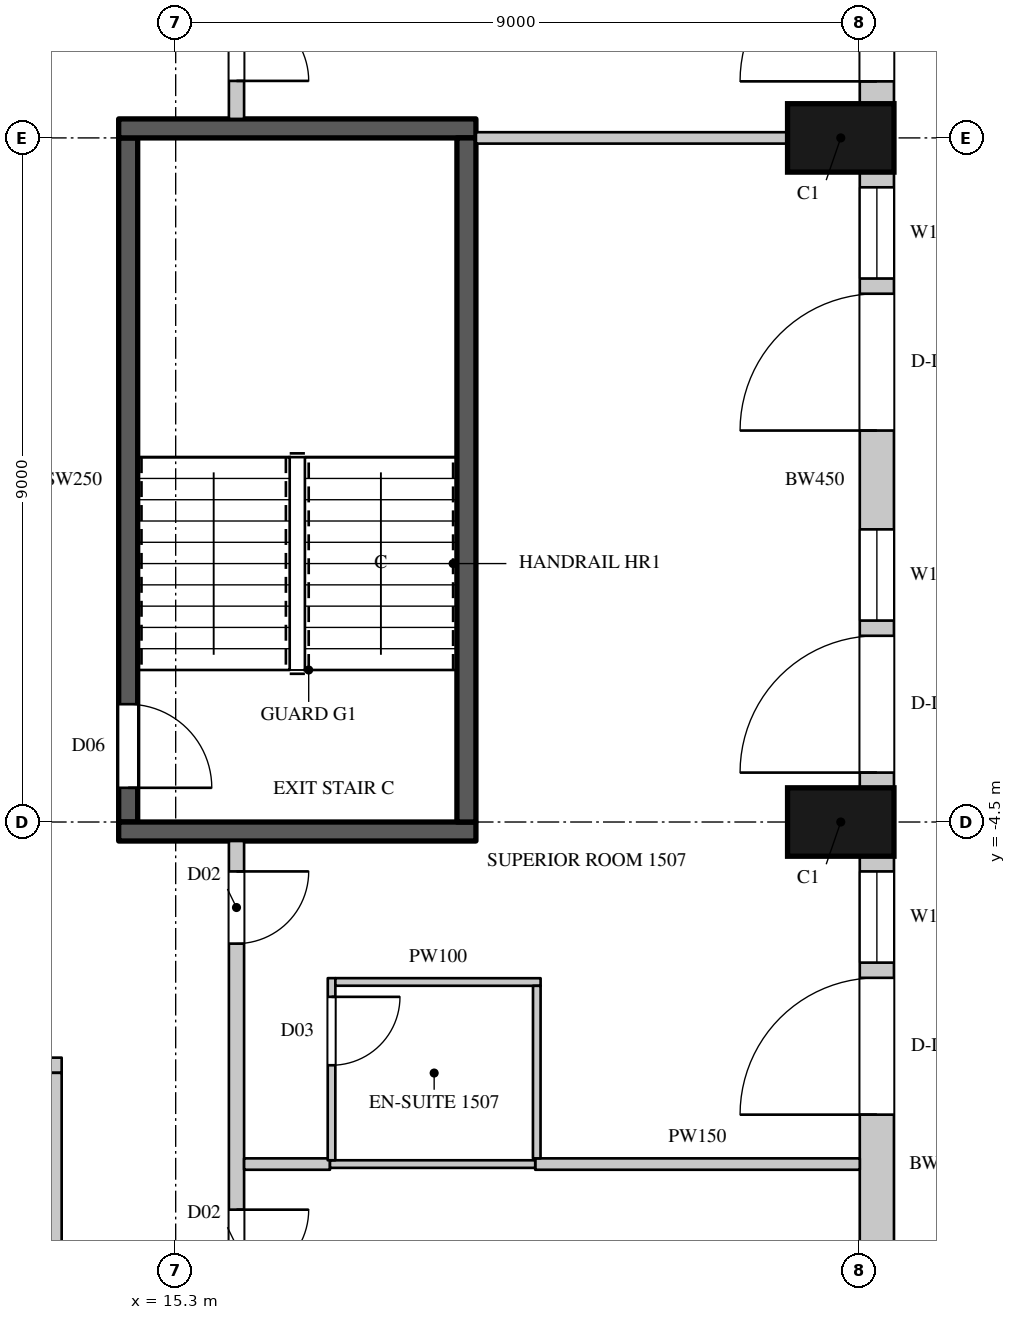
"""IFC4 building model, lengths in metres.
Left out: names, types, materials, properties, quantities, classifications, styles, units other than length and angle.
Written with IfcOpenShell. Run it as: python <this file> out.ifc"""

import sys

from ifc_helpers import new_model, si_unit, direction, frame, frame_2d, origin, origin_2d, place, context, subcontext, project, spatial, rectangle, extrude, element, fill, save


model = new_model("IFC4")
c1 = context("Model", 3, precision=1e-05, world=origin(), true_north=direction((0.0, 1.0)))
c2 = subcontext(c1, "Body", "Model", "MODEL_VIEW")
j1 = project(units=[si_unit("LENGTHUNIT", "METRE"), si_unit("PLANEANGLEUNIT", "RADIAN")], contexts=[c1])
p1 = place(None, origin())
s1 = spatial("IfcSite", under=j1, at=p1, CompositionType="ELEMENT")
p2 = place(p1, origin())
s2 = spatial("IfcBuilding", under=s1, at=p2, CompositionType="ELEMENT")
p3 = place(p2, frame((0.0, 0.0, 84.3)))
s3 = spatial("IfcBuildingStorey", under=s2, at=p3, CompositionType="ELEMENT", Elevation=84.3)
for number, where, z_axis, x_axis in (
    (1, (24.05, -4.5, 0.0), (0.0, 0.0, 1.0), (0.0, 1.0, 0.0)),
    (2, (24.05, 4.5, 0.0), (0.0, 0.0, 1.0), (0.0, 1.0, 0.0)),
):
    element("IfcColumn", number, at=place(p3, frame(where, z_axis=z_axis, x_axis=x_axis)), inside=s3, PredefinedType="COLUMN", context=c2, shape_type="SweptSolid", body=[
        extrude(rectangle(XDim=0.9, YDim=1.4, at=origin_2d()), origin(), (0.0, 0.0, 1.0), 3.6),
    ])
p4 = place(p3, frame((24.525, -13.05, 0.0), z_axis=(0.0, 0.0, 1.0), x_axis=(0.0, 1.0, 0.0)))
e3 = element("IfcWall", 3, at=p4, inside=s3, PredefinedType="SOLIDWALL", context=c2, shape_type="SweptSolid", body=[
    extrude(rectangle(XDim=8.1, YDim=0.45, at=frame_2d((4.05, 0.0))), origin(), (0.0, 0.0, 1.0), 3.3),
])
p5 = place(p4, frame((0.9, 0.0, 0.0)))
e4 = element("IfcOpeningElement", 4, at=p5, cuts=e3, PredefinedType="OPENING", context=c2, shape_type="SweptSolid", body=[
    extrude(rectangle(XDim=1.8, YDim=2.4, at=frame_2d((0.9, 1.2))), frame((0.0, 0.235, 0.0), z_axis=(0.0, -1.0, 0.0), x_axis=(1.0, 0.0, 0.0)), (0.0, 0.0, 1.0), 0.47),
])
p6 = place(p4, frame((4.7, 0.0, 0.0)))
e5 = element("IfcOpeningElement", 5, at=p6, cuts=e3, PredefinedType="OPENING", context=c2, shape_type="SweptSolid", body=[
    extrude(rectangle(XDim=1.8, YDim=2.4, at=frame_2d((0.9, 1.2))), frame((0.0, 0.235, 0.0), z_axis=(0.0, -1.0, 0.0), x_axis=(1.0, 0.0, 0.0)), (0.0, 0.0, 1.0), 0.47),
])
p7 = place(p4, frame((6.7, 0.0, 1.05)))
e6 = element("IfcOpeningElement", 6, at=p7, cuts=e3, PredefinedType="OPENING", context=c2, shape_type="SweptSolid", body=[
    extrude(rectangle(XDim=1.2, YDim=2.0, at=frame_2d((0.6, 1.0))), frame((0.0, 0.235, 0.0), z_axis=(0.0, -1.0, 0.0), x_axis=(1.0, 0.0, 0.0)), (0.0, 0.0, 1.0), 0.47),
])
p8 = place(p3, frame((24.525, -4.05, 0.0), z_axis=(0.0, 0.0, 1.0), x_axis=(0.0, 1.0, 0.0)))
e7 = element("IfcWall", 7, at=p8, inside=s3, PredefinedType="SOLIDWALL", context=c2, shape_type="SweptSolid", body=[
    extrude(rectangle(XDim=8.1, YDim=0.45, at=frame_2d((4.05, 0.0))), origin(), (0.0, 0.0, 1.0), 3.3),
])
p9 = place(p8, frame((0.2, 0.0, 0.0)))
e8 = element("IfcOpeningElement", 8, at=p9, cuts=e7, PredefinedType="OPENING", context=c2, shape_type="SweptSolid", body=[
    extrude(rectangle(XDim=1.8, YDim=2.4, at=frame_2d((0.9, 1.2))), frame((0.0, 0.235, 0.0), z_axis=(0.0, -1.0, 0.0), x_axis=(1.0, 0.0, 0.0)), (0.0, 0.0, 1.0), 0.47),
])
p10 = place(p8, frame((2.2, 0.0, 1.05)))
e9 = element("IfcOpeningElement", 9, at=p10, cuts=e7, PredefinedType="OPENING", context=c2, shape_type="SweptSolid", body=[
    extrude(rectangle(XDim=1.2, YDim=2.0, at=frame_2d((0.6, 1.0))), frame((0.0, 0.235, 0.0), z_axis=(0.0, -1.0, 0.0), x_axis=(1.0, 0.0, 0.0)), (0.0, 0.0, 1.0), 0.47),
])
p11 = place(p8, frame((4.7, 0.0, 0.0)))
e10 = element("IfcOpeningElement", 10, at=p11, cuts=e7, PredefinedType="OPENING", context=c2, shape_type="SweptSolid", body=[
    extrude(rectangle(XDim=1.8, YDim=2.4, at=frame_2d((0.9, 1.2))), frame((0.0, 0.235, 0.0), z_axis=(0.0, -1.0, 0.0), x_axis=(1.0, 0.0, 0.0)), (0.0, 0.0, 1.0), 0.47),
])
p12 = place(p8, frame((6.7, 0.0, 1.05)))
e11 = element("IfcOpeningElement", 11, at=p12, cuts=e7, PredefinedType="OPENING", context=c2, shape_type="SweptSolid", body=[
    extrude(rectangle(XDim=1.2, YDim=2.0, at=frame_2d((0.6, 1.0))), frame((0.0, 0.235, 0.0), z_axis=(0.0, -1.0, 0.0), x_axis=(1.0, 0.0, 0.0)), (0.0, 0.0, 1.0), 0.47),
])
p13 = place(p3, frame((24.525, 4.95, 0.0), z_axis=(0.0, 0.0, 1.0), x_axis=(0.0, 1.0, 0.0)))
e12 = element("IfcWall", 12, at=p13, inside=s3, PredefinedType="SOLIDWALL", context=c2, shape_type="SweptSolid", body=[
    extrude(rectangle(XDim=8.439, YDim=0.45, at=frame_2d((4.219, 0.0))), origin(), (0.0, 0.0, 1.0), 3.3),
])
p14 = place(p13, frame((0.294, 0.0, 0.0)))
e13 = element("IfcOpeningElement", 13, at=p14, cuts=e12, PredefinedType="OPENING", context=c2, shape_type="SweptSolid", body=[
    extrude(rectangle(XDim=1.8, YDim=2.4, at=frame_2d((0.9, 1.2))), frame((0.0, 0.235, 0.0), z_axis=(0.0, -1.0, 0.0), x_axis=(1.0, 0.0, 0.0)), (0.0, 0.0, 1.0), 0.47),
])
p15 = place(p13, frame((2.294, 0.0, 1.05)))
e14 = element("IfcOpeningElement", 14, at=p15, cuts=e12, PredefinedType="OPENING", context=c2, shape_type="SweptSolid", body=[
    extrude(rectangle(XDim=1.2, YDim=2.0, at=frame_2d((0.6, 1.0))), frame((0.0, 0.235, 0.0), z_axis=(0.0, -1.0, 0.0), x_axis=(1.0, 0.0, 0.0)), (0.0, 0.0, 1.0), 0.47),
])
p16 = place(p13, frame((5.232, 0.0, 1.05)))
e15 = element("IfcOpeningElement", 15, at=p16, cuts=e12, PredefinedType="OPENING", context=c2, shape_type="SweptSolid", body=[
    extrude(rectangle(XDim=2.7, YDim=2.0, at=frame_2d((1.35, 1.0))), frame((0.0, 0.235, 0.0), z_axis=(0.0, -1.0, 0.0), x_axis=(1.0, 0.0, 0.0)), (0.0, 0.0, 1.0), 0.47),
])
p17 = place(p3, frame((10.1, -7.7, 0.0), z_axis=(0.0, 0.0, 1.0), x_axis=(1.0, 0.0, 0.0)))
e16 = element("IfcWall", 16, at=p17, inside=s3, PredefinedType="PARTITIONING", context=c2, shape_type="SweptSolid", body=[
    extrude(rectangle(XDim=3.7, YDim=0.2, at=frame_2d((1.85, 0.0))), origin(), (0.0, 0.0, 1.0), 3.3),
])
p18 = place(p17, frame((2.45, 0.0, 0.0)))
e17 = element("IfcOpeningElement", 17, at=p18, cuts=e16, PredefinedType="OPENING", context=c2, shape_type="SweptSolid", body=[
    extrude(rectangle(XDim=0.9, YDim=2.2, at=frame_2d((0.45, 1.1))), frame((0.0, 0.11, 0.0), z_axis=(0.0, -1.0, 0.0), x_axis=(1.0, 0.0, 0.0)), (0.0, 0.0, 1.0), 0.22),
])
p19 = place(p3, frame((13.7, -15.0, 0.0), z_axis=(0.0, 0.0, 1.0), x_axis=(0.0, 1.0, 0.0)))
e18 = element("IfcWall", 18, at=p19, inside=s3, PredefinedType="PARTITIONING", context=c2, shape_type="SweptSolid", body=[
    extrude(rectangle(XDim=7.2, YDim=0.2, at=frame_2d((3.6, 0.0))), origin(), (0.0, 0.0, 1.0), 3.3),
])
p20 = place(p3, frame((16.1, -17.5, 0.0), z_axis=(0.0, 0.0, 1.0), x_axis=(0.0, 1.0, 0.0)))
e19 = element("IfcWall", 19, at=p20, inside=s3, PredefinedType="PARTITIONING", context=c2, shape_type="SweptSolid", body=[
    extrude(rectangle(XDim=12.75, YDim=0.2, at=frame_2d((6.375, 0.0))), origin(), (0.0, 0.0, 1.0), 3.3),
])
p21 = place(p20, frame((2.75, 0.0, 0.0)))
e20 = element("IfcOpeningElement", 20, at=p21, cuts=e19, PredefinedType="OPENING", context=c2, shape_type="SweptSolid", body=[
    extrude(rectangle(XDim=0.95, YDim=2.2, at=frame_2d((0.475, 1.1))), frame((0.0, 0.11, 0.0), z_axis=(0.0, -1.0, 0.0), x_axis=(1.0, 0.0, 0.0)), (0.0, 0.0, 1.0), 0.22),
])
p22 = place(p20, frame((6.95, 0.0, 0.0)))
e21 = element("IfcOpeningElement", 21, at=p22, cuts=e19, PredefinedType="OPENING", context=c2, shape_type="SweptSolid", body=[
    extrude(rectangle(XDim=0.95, YDim=2.2, at=frame_2d((0.475, 1.1))), frame((0.0, 0.11, 0.0), z_axis=(0.0, -1.0, 0.0), x_axis=(1.0, 0.0, 0.0)), (0.0, 0.0, 1.0), 0.22),
])
p23 = place(p20, frame((11.4, 0.0, 0.0)))
e22 = element("IfcOpeningElement", 22, at=p23, cuts=e19, PredefinedType="OPENING", context=c2, shape_type="SweptSolid", body=[
    extrude(rectangle(XDim=0.95, YDim=2.2, at=frame_2d((0.475, 1.1))), frame((0.0, 0.11, 0.0), z_axis=(0.0, -1.0, 0.0), x_axis=(1.0, 0.0, 0.0)), (0.0, 0.0, 1.0), 0.22),
])
p24 = place(p3, frame((16.1, 4.75, 0.0), z_axis=(0.0, 0.0, 1.0), x_axis=(0.0, 1.0, 0.0)))
e23 = element("IfcWall", 23, at=p24, inside=s3, PredefinedType="PARTITIONING", context=c2, shape_type="SweptSolid", body=[
    extrude(rectangle(XDim=12.65, YDim=0.2, at=frame_2d((6.325, 0.0))), origin(), (0.0, 0.0, 1.0), 3.3),
])
p25 = place(p24, frame((0.5, 0.0, 0.0)))
e24 = element("IfcOpeningElement", 24, at=p25, cuts=e23, PredefinedType="OPENING", context=c2, shape_type="SweptSolid", body=[
    extrude(rectangle(XDim=0.95, YDim=2.2, at=frame_2d((0.475, 1.1))), frame((0.0, 0.11, 0.0), z_axis=(0.0, -1.0, 0.0), x_axis=(1.0, 0.0, 0.0)), (0.0, 0.0, 1.0), 0.22),
])
p26 = place(p24, frame((6.9, 0.0, 0.0)))
e25 = element("IfcOpeningElement", 25, at=p26, cuts=e23, PredefinedType="OPENING", context=c2, shape_type="SweptSolid", body=[
    extrude(rectangle(XDim=0.95, YDim=2.2, at=frame_2d((0.475, 1.1))), frame((0.0, 0.11, 0.0), z_axis=(0.0, -1.0, 0.0), x_axis=(1.0, 0.0, 0.0)), (0.0, 0.0, 1.0), 0.22),
])
p27 = place(p3, frame((16.2, -9.0, 0.0), z_axis=(0.0, 0.0, 1.0), x_axis=(1.0, 0.0, 0.0)))
e26 = element("IfcWall", 26, at=p27, inside=s3, PredefinedType="PARTITIONING", context=c2, shape_type="SweptSolid", body=[
    extrude(rectangle(XDim=1.13, YDim=0.15, at=frame_2d((0.565, 0.0))), origin(), (0.0, 0.0, 1.0), 2.65),
])
p28 = place(p3, frame((19.25, 4.5, 0.0), z_axis=(0.0, 0.0, 1.0), x_axis=(1.0, 0.0, 0.0)))
e27 = element("IfcWall", 27, at=p28, inside=s3, PredefinedType="PARTITIONING", context=c2, shape_type="SweptSolid", body=[
    extrude(rectangle(XDim=4.1, YDim=0.15, at=frame_2d((2.05, 0.0))), origin(), (0.0, 0.0, 1.0), 3.3),
])
p29 = place(p3, frame((20.03, -9.0, 0.0), z_axis=(0.0, 0.0, 1.0), x_axis=(1.0, 0.0, 0.0)))
e28 = element("IfcWall", 28, at=p29, inside=s3, PredefinedType="PARTITIONING", context=c2, shape_type="SweptSolid", body=[
    extrude(rectangle(XDim=4.27, YDim=0.15, at=frame_2d((2.135, 0.0))), origin(), (0.0, 0.0, 1.0), 2.65),
])
p30 = place(p3, frame((14.675, -4.5, 0.0), z_axis=(0.0, 0.0, 1.0), x_axis=(0.0, 1.0, 0.0)))
e29 = element("IfcWall", 29, at=p30, inside=s3, PredefinedType="SHEAR", context=c2, shape_type="SweptSolid", body=[
    extrude(rectangle(XDim=9.0, YDim=0.25, at=frame_2d((4.5, 0.0))), origin(), (0.0, 0.0, 1.0), 3.3),
])
p31 = place(p30, frame((0.45, 0.0, 0.0)))
e30 = element("IfcOpeningElement", 30, at=p31, cuts=e29, PredefinedType="OPENING", context=c2, shape_type="SweptSolid", body=[
    extrude(rectangle(XDim=1.1, YDim=2.2, at=frame_2d((0.55, 1.1))), frame((0.0, 0.135, 0.0), z_axis=(0.0, -1.0, 0.0), x_axis=(1.0, 0.0, 0.0)), (0.0, 0.0, 1.0), 0.27),
])
for number, where, z_axis, x_axis in (
    (31, (14.55, -4.625, 0.0), (0.0, 0.0, 1.0), (1.0, 0.0, 0.0)),
    (32, (14.55, 4.625, 0.0), (0.0, 0.0, 1.0), (1.0, 0.0, 0.0)),
):
    element("IfcWall", number, at=place(p3, frame(where, z_axis=z_axis, x_axis=x_axis)), inside=s3, PredefinedType="SHEAR", context=c2, shape_type="SweptSolid", body=[
        extrude(rectangle(XDim=4.7, YDim=0.25, at=frame_2d((2.35, 0.0))), origin(), (0.0, 0.0, 1.0), 3.3),
    ])
p32 = place(p3, frame((19.125, -4.5, 0.0), z_axis=(0.0, 0.0, 1.0), x_axis=(0.0, 1.0, 0.0)))
e33 = element("IfcWall", 33, at=p32, inside=s3, PredefinedType="SHEAR", context=c2, shape_type="SweptSolid", body=[
    extrude(rectangle(XDim=9.0, YDim=0.25, at=frame_2d((4.5, 0.0))), origin(), (0.0, 0.0, 1.0), 3.3),
])
p33 = place(p3, frame((17.33, -9.0, 0.0), z_axis=(0.0, 0.0, 1.0), x_axis=(1.0, 0.0, 0.0)))
e34 = element("IfcWall", 34, at=p33, inside=s3, PredefinedType="PARTITIONING", context=c2, shape_type="SweptSolid", body=[
    extrude(rectangle(XDim=2.7, YDim=0.1, at=frame_2d((1.35, 0.0))), origin(), (0.0, 0.0, 1.0), 2.65),
])
p34 = place(p3, frame((17.35, -8.95, 0.0), z_axis=(0.0, 0.0, 1.0), x_axis=(0.000407580973, 0.999999916939, 0.0)))
e35 = element("IfcWall", 35, at=p34, inside=s3, PredefinedType="PARTITIONING", context=c2, shape_type="SweptSolid", body=[
    extrude(rectangle(XDim=2.396, YDim=0.1, at=frame_2d((1.198, 0.0))), origin(), (0.0, 0.0, 1.0), 3.3),
])
p35 = place(p34, frame((1.25, 0.0, 0.0)))
e36 = element("IfcOpeningElement", 36, at=p35, cuts=e35, PredefinedType="OPENING", context=c2, shape_type="SweptSolid", body=[
    extrude(rectangle(XDim=0.9, YDim=2.2, at=frame_2d((0.45, 1.1))), frame((0.0, 0.06, 0.0), z_axis=(0.0, -1.0, 0.0), x_axis=(1.0, 0.0, 0.0)), (0.0, 0.0, 1.0), 0.12),
])
p36 = place(p3, frame((17.401, -6.604, 0.0), z_axis=(0.0, 0.0, 1.0), x_axis=(0.9999999346, -0.000361663629, 0.0)))
e37 = element("IfcWall", 37, at=p36, inside=s3, PredefinedType="PARTITIONING", context=c2, shape_type="SweptSolid", body=[
    extrude(rectangle(XDim=2.7, YDim=0.1, at=frame_2d((1.35, 0.0))), origin(), (0.0, 0.0, 1.0), 3.3),
])
p37 = place(p3, frame((20.05, -8.925, 0.0), z_axis=(0.0, 0.0, 1.0), x_axis=(0.000430200003, 0.999999907464, 0.0)))
e38 = element("IfcWall", 38, at=p37, inside=s3, PredefinedType="PARTITIONING", context=c2, shape_type="SweptSolid", body=[
    extrude(rectangle(XDim=2.27, YDim=0.1, at=frame_2d((1.135, 0.0))), origin(), (0.0, 0.0, 1.0), 3.3),
])
p38 = place(p6, origin())
e39 = element("IfcDoor", 39, at=p38, inside=s3, OperationType="SLIDING_TO_LEFT", PredefinedType="DOOR", context=c2, shape_type="SweptSolid", body=[
    extrude(rectangle(XDim=1.8, YDim=2.4, at=frame_2d((0.9, 1.2))), frame((0.0, 0.13, 0.0), z_axis=(0.0, -1.0, 0.0), x_axis=(1.0, 0.0, 0.0)), (0.0, 0.0, 1.0), 0.05),
])
fill(e5, e39)
p39 = place(p7, origin())
e40 = element("IfcWindow", 40, at=p39, inside=s3, PartitioningType="SINGLE_PANEL", PredefinedType="WINDOW", context=c2, shape_type="SweptSolid", body=[
    extrude(rectangle(XDim=1.2, YDim=2.0, at=frame_2d((0.6, 1.0))), frame((0.0, 0.135, 0.0), z_axis=(0.0, -1.0, 0.0), x_axis=(1.0, 0.0, 0.0)), (0.0, 0.0, 1.0), 0.06),
])
fill(e6, e40)
p40 = place(p9, origin())
e41 = element("IfcDoor", 41, at=p40, inside=s3, OperationType="SLIDING_TO_LEFT", PredefinedType="DOOR", context=c2, shape_type="SweptSolid", body=[
    extrude(rectangle(XDim=1.8, YDim=2.4, at=frame_2d((0.9, 1.2))), frame((0.0, 0.13, 0.0), z_axis=(0.0, -1.0, 0.0), x_axis=(1.0, 0.0, 0.0)), (0.0, 0.0, 1.0), 0.05),
])
fill(e8, e41)
p41 = place(p10, origin())
e42 = element("IfcWindow", 42, at=p41, inside=s3, PartitioningType="SINGLE_PANEL", PredefinedType="WINDOW", context=c2, shape_type="SweptSolid", body=[
    extrude(rectangle(XDim=1.2, YDim=2.0, at=frame_2d((0.6, 1.0))), frame((0.0, 0.135, 0.0), z_axis=(0.0, -1.0, 0.0), x_axis=(1.0, 0.0, 0.0)), (0.0, 0.0, 1.0), 0.06),
])
fill(e9, e42)
p42 = place(p11, origin())
e43 = element("IfcDoor", 43, at=p42, inside=s3, OperationType="SLIDING_TO_LEFT", PredefinedType="DOOR", context=c2, shape_type="SweptSolid", body=[
    extrude(rectangle(XDim=1.8, YDim=2.4, at=frame_2d((0.9, 1.2))), frame((0.0, 0.13, 0.0), z_axis=(0.0, -1.0, 0.0), x_axis=(1.0, 0.0, 0.0)), (0.0, 0.0, 1.0), 0.05),
])
fill(e10, e43)
p43 = place(p12, origin())
e44 = element("IfcWindow", 44, at=p43, inside=s3, PartitioningType="SINGLE_PANEL", PredefinedType="WINDOW", context=c2, shape_type="SweptSolid", body=[
    extrude(rectangle(XDim=1.2, YDim=2.0, at=frame_2d((0.6, 1.0))), frame((0.0, 0.135, 0.0), z_axis=(0.0, -1.0, 0.0), x_axis=(1.0, 0.0, 0.0)), (0.0, 0.0, 1.0), 0.06),
])
fill(e11, e44)
p44 = place(p14, origin())
e45 = element("IfcDoor", 45, at=p44, inside=s3, OperationType="SLIDING_TO_LEFT", PredefinedType="DOOR", context=c2, shape_type="SweptSolid", body=[
    extrude(rectangle(XDim=1.8, YDim=2.4, at=frame_2d((0.9, 1.2))), frame((0.0, 0.13, 0.0), z_axis=(0.0, -1.0, 0.0), x_axis=(1.0, 0.0, 0.0)), (0.0, 0.0, 1.0), 0.05),
])
fill(e13, e45)
p45 = place(p22, origin())
e46 = element("IfcDoor", 46, at=p45, inside=s3, OperationType="SINGLE_SWING_LEFT", PredefinedType="DOOR", context=c2, shape_type="SweptSolid", body=[
    extrude(rectangle(XDim=0.95, YDim=2.2, at=frame_2d((0.475, 1.1))), frame((0.0, 0.025, 0.0), z_axis=(0.0, -1.0, 0.0), x_axis=(1.0, 0.0, 0.0)), (0.0, 0.0, 1.0), 0.05),
])
fill(e21, e46)
p46 = place(p23, origin())
e47 = element("IfcDoor", 47, at=p46, inside=s3, OperationType="SINGLE_SWING_LEFT", PredefinedType="DOOR", context=c2, shape_type="SweptSolid", body=[
    extrude(rectangle(XDim=0.95, YDim=2.2, at=frame_2d((0.475, 1.1))), frame((0.0, 0.025, 0.0), z_axis=(0.0, -1.0, 0.0), x_axis=(1.0, 0.0, 0.0)), (0.0, 0.0, 1.0), 0.05),
])
fill(e22, e47)
p47 = place(p35, origin())
e48 = element("IfcDoor", 48, at=p47, inside=s3, OperationType="SINGLE_SWING_LEFT", PredefinedType="DOOR", context=c2, shape_type="SweptSolid", body=[
    extrude(rectangle(XDim=0.9, YDim=2.2, at=frame_2d((0.45, 1.1))), frame((0.0, 0.025, 0.0), z_axis=(0.0, -1.0, 0.0), x_axis=(1.0, 0.0, 0.0)), (0.0, 0.0, 1.0), 0.05),
])
fill(e36, e48)
p48 = place(p25, origin())
e49 = element("IfcDoor", 49, at=p48, inside=s3, OperationType="SINGLE_SWING_RIGHT", PredefinedType="DOOR", context=c2, shape_type="SweptSolid", body=[
    extrude(rectangle(XDim=0.95, YDim=2.2, at=frame_2d((0.475, 1.1))), frame((0.0, 0.025, 0.0), z_axis=(0.0, -1.0, 0.0), x_axis=(1.0, 0.0, 0.0)), (0.0, 0.0, 1.0), 0.05),
])
fill(e24, e49)
p49 = place(p31, origin())
e50 = element("IfcDoor", 50, at=p49, inside=s3, OperationType="SINGLE_SWING_RIGHT", PredefinedType="DOOR", context=c2, shape_type="SweptSolid", body=[
    extrude(rectangle(XDim=1.1, YDim=2.2, at=frame_2d((0.55, 1.1))), frame((0.0, 0.025, 0.0), z_axis=(0.0, -1.0, 0.0), x_axis=(1.0, 0.0, 0.0)), (0.0, 0.0, 1.0), 0.05),
])
fill(e30, e50)
save(model, sys.argv[1])
